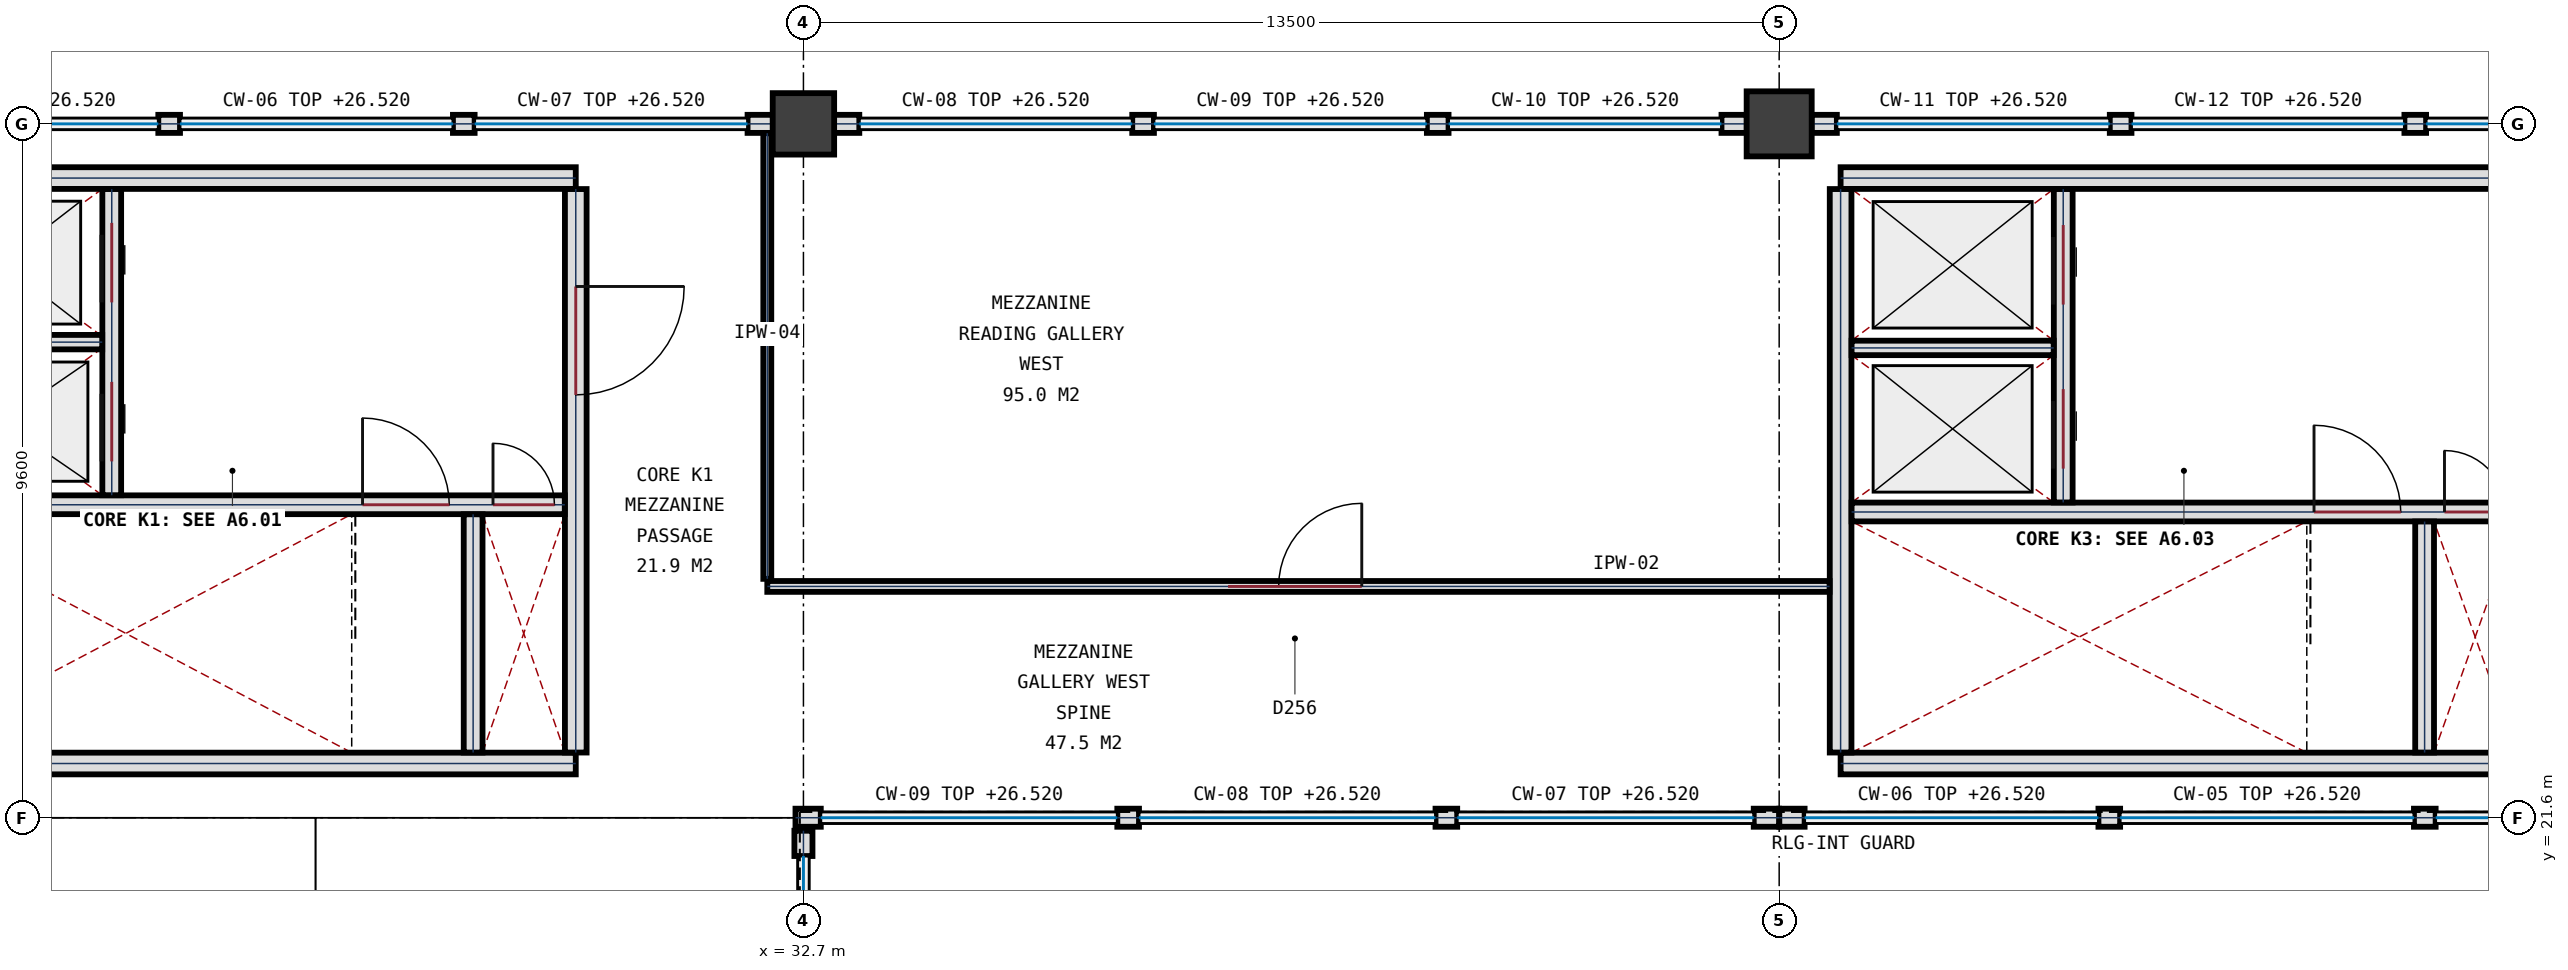
"""IFC4 building model, lengths in metres.
Left out: names, types, materials, properties, quantities, classifications, styles, units other than length and angle.
Written with IfcOpenShell. Run it as: python <this file> out.ifc"""

import sys

from ifc_helpers import new_model, si_unit, direction, frame, frame_2d, origin, origin_2d, place, context, subcontext, project, spatial, rectangle, circle, extrude, element, fill, save


model = new_model("IFC4")
c1 = context("Model", 3, precision=1e-05, world=origin(), true_north=direction((0.0, 1.0)))
c2 = subcontext(c1, "Body", "Model", "MODEL_VIEW")
j1 = project(units=[si_unit("LENGTHUNIT", "METRE"), si_unit("PLANEANGLEUNIT", "RADIAN")], contexts=[c1])
p1 = place(None, origin())
s1 = spatial("IfcSite", under=j1, at=p1, CompositionType="ELEMENT")
p2 = place(p1, origin())
s2 = spatial("IfcBuilding", under=s1, at=p2, CompositionType="ELEMENT")
p3 = place(p2, frame((0.0, 0.0, 23.4)))
s3 = spatial("IfcBuildingStorey", under=s2, at=p3, CompositionType="ELEMENT", Elevation=23.4)
p4 = place(p3, frame((32.7, 31.2, 0.0), z_axis=(0.0, 0.0, 1.0), x_axis=(1.0, 0.0, 0.0)))
e1 = element("IfcColumn", 1, at=p4, inside=s3, PredefinedType="COLUMN", context=c2, shape_type="SweptSolid", body=[
    extrude(rectangle(XDim=0.85, YDim=0.85, at=origin_2d()), origin(), (0.0, 0.0, 1.0), 4.5),
])
p5 = place(p3, frame((46.2, 31.2, 0.0), z_axis=(0.0, 0.0, 1.0), x_axis=(1.0, 0.0, 0.0)))
e2 = element("IfcColumn", 2, at=p5, inside=s3, PredefinedType="COLUMN", context=c2, shape_type="SweptSolid", body=[
    extrude(circle(Radius=0.45, at=origin_2d()), origin(), (0.0, 0.0, 1.0), 4.5),
])
p6 = place(p3, frame((31.927, 31.2, 0.0), z_axis=(0.0, 0.0, 1.0), x_axis=(1.0, 0.0, 0.0)))
e3 = element("IfcWall", 3, at=p6, inside=s3, PredefinedType="SOLIDWALL", context=c2, shape_type="SweptSolid", body=[
    extrude(rectangle(XDim=0.35, YDim=0.25, at=frame_2d((0.175, 0.0))), origin(), (0.0, 0.0, 1.0), 3.12),
])
p7 = place(p3, frame((23.774, 31.2, 0.0), z_axis=(0.0, 0.0, 1.0), x_axis=(1.0, 0.0, 0.0)))
e4 = element("IfcWall", 4, at=p7, inside=s3, PredefinedType="SOLIDWALL", context=c2, shape_type="SweptSolid", body=[
    extrude(rectangle(XDim=0.3, YDim=0.25, at=frame_2d((0.15, 0.0))), origin(), (0.0, 0.0, 1.0), 3.12),
])
p8 = place(p3, frame((27.851, 31.2, 0.0), z_axis=(0.0, 0.0, 1.0), x_axis=(1.0, 0.0, 0.0)))
e5 = element("IfcWall", 5, at=p8, inside=s3, PredefinedType="SOLIDWALL", context=c2, shape_type="SweptSolid", body=[
    extrude(rectangle(XDim=0.3, YDim=0.25, at=frame_2d((0.15, 0.0))), origin(), (0.0, 0.0, 1.0), 3.12),
])
for number, where, z_axis, x_axis in (
    (6, (33.123, 31.2, 0.0), (0.0, 0.0, 1.0), (1.0, 0.0, 0.0)),
    (7, (45.402, 31.2, 0.0), (0.0, 0.0, 1.0), (1.0, 0.0, 0.0)),
):
    element("IfcWall", number, at=place(p3, frame(where, z_axis=z_axis, x_axis=x_axis)), inside=s3, PredefinedType="SOLIDWALL", context=c2, shape_type="SweptSolid", body=[
        extrude(rectangle(XDim=0.35, YDim=0.25, at=frame_2d((0.175, 0.0))), origin(), (0.0, 0.0, 1.0), 3.12),
    ])
for number, where, z_axis, x_axis in (
    (8, (37.249, 31.2, 0.0), (0.0, 0.0, 1.0), (1.0, 0.0, 0.0)),
    (9, (41.326, 31.2, 0.0), (0.0, 0.0, 1.0), (1.0, 0.0, 0.0)),
):
    element("IfcWall", number, at=place(p3, frame(where, z_axis=z_axis, x_axis=x_axis)), inside=s3, PredefinedType="SOLIDWALL", context=c2, shape_type="SweptSolid", body=[
        extrude(rectangle(XDim=0.3, YDim=0.25, at=frame_2d((0.15, 0.0))), origin(), (0.0, 0.0, 1.0), 3.12),
    ])
p9 = place(p3, frame((46.648, 31.2, 0.0), z_axis=(0.0, 0.0, 1.0), x_axis=(1.0, 0.0, 0.0)))
e10 = element("IfcWall", 10, at=p9, inside=s3, PredefinedType="SOLIDWALL", context=c2, shape_type="SweptSolid", body=[
    extrude(rectangle(XDim=0.35, YDim=0.25, at=frame_2d((0.175, 0.0))), origin(), (0.0, 0.0, 1.0), 3.12),
])
p10 = place(p3, frame((50.774, 31.2, 0.0), z_axis=(0.0, 0.0, 1.0), x_axis=(1.0, 0.0, 0.0)))
e11 = element("IfcWall", 11, at=p10, inside=s3, PredefinedType="SOLIDWALL", context=c2, shape_type="SweptSolid", body=[
    extrude(rectangle(XDim=0.3, YDim=0.25, at=frame_2d((0.15, 0.0))), origin(), (0.0, 0.0, 1.0), 3.12),
])
p11 = place(p3, frame((54.851, 31.2, 0.0), z_axis=(0.0, 0.0, 1.0), x_axis=(1.0, 0.0, 0.0)))
e12 = element("IfcWall", 12, at=p11, inside=s3, PredefinedType="SOLIDWALL", context=c2, shape_type="SweptSolid", body=[
    extrude(rectangle(XDim=0.3, YDim=0.25, at=frame_2d((0.15, 0.0))), origin(), (0.0, 0.0, 1.0), 3.12),
])
p12 = place(p3, frame((46.552, 21.6, 0.0), z_axis=(0.0, 0.0, 1.0), x_axis=(-1.0, 0.0, 0.0)))
e13 = element("IfcWall", 13, at=p12, inside=s3, PredefinedType="SOLIDWALL", context=c2, shape_type="SweptSolid", body=[
    extrude(rectangle(XDim=0.35, YDim=0.25, at=frame_2d((0.175, 0.0))), origin(), (0.0, 0.0, 1.0), 3.12),
])
p13 = place(p3, frame((55.283, 21.6, 0.0), z_axis=(0.0, 0.0, 1.0), x_axis=(-1.0, 0.0, 0.0)))
e14 = element("IfcWall", 14, at=p13, inside=s3, PredefinedType="SOLIDWALL", context=c2, shape_type="SweptSolid", body=[
    extrude(rectangle(XDim=0.3, YDim=0.25, at=frame_2d((0.15, 0.0))), origin(), (0.0, 0.0, 1.0), 3.12),
])
p14 = place(p3, frame((50.917, 21.6, 0.0), z_axis=(0.0, 0.0, 1.0), x_axis=(-1.0, 0.0, 0.0)))
e15 = element("IfcWall", 15, at=p14, inside=s3, PredefinedType="SOLIDWALL", context=c2, shape_type="SweptSolid", body=[
    extrude(rectangle(XDim=0.3, YDim=0.25, at=frame_2d((0.15, 0.0))), origin(), (0.0, 0.0, 1.0), 3.12),
])
p15 = place(p3, frame((46.198, 21.6, 0.0), z_axis=(0.0, 0.0, 1.0), x_axis=(-1.0, 0.0, 0.0)))
e16 = element("IfcWall", 16, at=p15, inside=s3, PredefinedType="SOLIDWALL", context=c2, shape_type="SweptSolid", body=[
    extrude(rectangle(XDim=0.35, YDim=0.25, at=frame_2d((0.175, 0.0))), origin(), (0.0, 0.0, 1.0), 3.12),
])
p16 = place(p3, frame((32.94, 21.6, 0.0), z_axis=(0.0, 0.0, 1.0), x_axis=(-1.0, 0.0, 0.0)))
e17 = element("IfcWall", 17, at=p16, inside=s3, PredefinedType="SOLIDWALL", context=c2, shape_type="SweptSolid", body=[
    extrude(rectangle(XDim=0.35, YDim=0.25, at=frame_2d((0.175, 0.0))), origin(), (0.0, 0.0, 1.0), 3.12),
])
for number, where, z_axis, x_axis in (
    (18, (41.745, 21.6, 0.0), (0.0, 0.0, 1.0), (-1.0, 0.0, 0.0)),
    (19, (37.343, 21.6, 0.0), (0.0, 0.0, 1.0), (-1.0, 0.0, 0.0)),
):
    element("IfcWall", number, at=place(p3, frame(where, z_axis=z_axis, x_axis=x_axis)), inside=s3, PredefinedType="SOLIDWALL", context=c2, shape_type="SweptSolid", body=[
        extrude(rectangle(XDim=0.3, YDim=0.25, at=frame_2d((0.15, 0.0))), origin(), (0.0, 0.0, 1.0), 3.12),
    ])
p17 = place(p3, frame((32.7, 21.42, 0.0), z_axis=(0.0, 0.0, 1.0), x_axis=(0.0, -1.0, 0.0)))
e20 = element("IfcWall", 20, at=p17, inside=s3, PredefinedType="SOLIDWALL", context=c2, shape_type="SweptSolid", body=[
    extrude(rectangle(XDim=0.35, YDim=0.25, at=frame_2d((0.175, 0.0))), origin(), (0.0, 0.0, 1.0), 3.12),
])
for number, where, z_axis, x_axis in (
    (21, (29.55, 22.35, 0.0), (0.0, 0.0, 1.0), (-1.0, 0.0, 0.0)),
    (22, (20.05, 30.45, 0.0), (0.0, 0.0, 1.0), (1.0, 0.0, 0.0)),
):
    element("IfcWall", number, at=place(p3, frame(where, z_axis=z_axis, x_axis=x_axis)), inside=s3, PredefinedType="SHEAR", context=c2, shape_type="SweptSolid", body=[
        extrude(rectangle(XDim=9.5, YDim=0.3, at=frame_2d((4.75, 0.0))), origin(), (0.0, 0.0, 1.0), 3.15),
    ])
p18 = place(p3, frame((29.55, 30.298, 0.0), z_axis=(0.0, 0.0, 1.0), x_axis=(0.0, -1.0, 0.0)))
e23 = element("IfcWall", 23, at=p18, inside=s3, PredefinedType="SHEAR", context=c2, shape_type="SweptSolid", body=[
    extrude(rectangle(XDim=7.796, YDim=0.3, at=frame_2d((3.898, 0.0))), origin(), (0.0, 0.0, 1.0), 3.15),
])
p19 = place(p18, frame((1.348, 0.0, 0.0)))
e24 = element("IfcOpeningElement", 24, at=p19, cuts=e23, PredefinedType="OPENING", context=c2, shape_type="SweptSolid", body=[
    extrude(rectangle(XDim=1.5, YDim=2.25, at=frame_2d((0.75, 1.125))), frame((0.0, 0.16, 0.0), z_axis=(0.0, -1.0, 0.0), x_axis=(1.0, 0.0, 0.0)), (0.0, 0.0, 1.0), 0.32),
])
p20 = place(p3, frame((20.202, 25.93, 0.0), z_axis=(0.0, 0.0, 1.0), x_axis=(1.0, 0.0, 0.0)))
e25 = element("IfcWall", 25, at=p20, inside=s3, PredefinedType="SHEAR", context=c2, shape_type="SweptSolid", body=[
    extrude(rectangle(XDim=9.196, YDim=0.26, at=frame_2d((4.598, 0.0))), origin(), (0.0, 0.0, 1.0), 3.15),
])
p21 = place(p20, frame((6.398, 0.0, 0.0)))
e26 = element("IfcOpeningElement", 26, at=p21, cuts=e25, PredefinedType="OPENING", context=c2, shape_type="SweptSolid", body=[
    extrude(rectangle(XDim=1.2, YDim=2.2, at=frame_2d((0.6, 1.1))), frame((0.0, 0.14, 0.0), z_axis=(0.0, -1.0, 0.0), x_axis=(1.0, 0.0, 0.0)), (0.0, 0.0, 1.0), 0.28),
])
p22 = place(p20, frame((8.203, 0.0, 0.0)))
e27 = element("IfcOpeningElement", 27, at=p22, cuts=e25, PredefinedType="OPENING", context=c2, shape_type="SweptSolid", body=[
    extrude(rectangle(XDim=0.85, YDim=2.05, at=frame_2d((0.425, 1.025))), frame((0.0, 0.14, 0.0), z_axis=(0.0, -1.0, 0.0), x_axis=(1.0, 0.0, 0.0)), (0.0, 0.0, 1.0), 0.28),
])
p23 = place(p3, frame((28.13, 22.502, 0.0), z_axis=(0.0, 0.0, 1.0), x_axis=(0.0, 1.0, 0.0)))
e28 = element("IfcWall", 28, at=p23, inside=s3, PredefinedType="SHEAR", context=c2, shape_type="SweptSolid", body=[
    extrude(rectangle(XDim=3.296, YDim=0.26, at=frame_2d((1.648, 0.0))), origin(), (0.0, 0.0, 1.0), 3.15),
])
p24 = place(p3, frame((23.13, 26.062, 0.0), z_axis=(0.0, 0.0, 1.0), x_axis=(0.0, 1.0, 0.0)))
e29 = element("IfcWall", 29, at=p24, inside=s3, PredefinedType="SHEAR", context=c2, shape_type="SweptSolid", body=[
    extrude(rectangle(XDim=4.236, YDim=0.26, at=frame_2d((2.118, 0.0))), origin(), (0.0, 0.0, 1.0), 3.15),
])
p25 = place(p24, frame((0.468, 0.0, 0.0)))
e30 = element("IfcOpeningElement", 30, at=p25, cuts=e29, PredefinedType="OPENING", context=c2, shape_type="SweptSolid", body=[
    extrude(rectangle(XDim=1.1, YDim=2.15, at=frame_2d((0.55, 1.075))), frame((0.0, 0.14, 0.0), z_axis=(0.0, -1.0, 0.0), x_axis=(1.0, 0.0, 0.0)), (0.0, 0.0, 1.0), 0.28),
])
p26 = place(p24, frame((2.668, 0.0, 0.0)))
e31 = element("IfcOpeningElement", 31, at=p26, cuts=e29, PredefinedType="OPENING", context=c2, shape_type="SweptSolid", body=[
    extrude(rectangle(XDim=1.1, YDim=2.15, at=frame_2d((0.55, 1.075))), frame((0.0, 0.14, 0.0), z_axis=(0.0, -1.0, 0.0), x_axis=(1.0, 0.0, 0.0)), (0.0, 0.0, 1.0), 0.28),
])
p27 = place(p3, frame((20.202, 28.18, 0.0), z_axis=(0.0, 0.0, 1.0), x_axis=(1.0, 0.0, 0.0)))
e32 = element("IfcWall", 32, at=p27, inside=s3, PredefinedType="PLUMBINGWALL", context=c2, shape_type="SweptSolid", body=[
    extrude(rectangle(XDim=2.796, YDim=0.2, at=frame_2d((1.398, 0.0))), origin(), (0.0, 0.0, 1.0), 3.1),
])
for number, where, z_axis, x_axis in (
    (33, (56.55, 22.35, 0.0), (0.0, 0.0, 1.0), (-1.0, 0.0, 0.0)),
    (34, (47.05, 30.45, 0.0), (0.0, 0.0, 1.0), (1.0, 0.0, 0.0)),
):
    element("IfcWall", number, at=place(p3, frame(where, z_axis=z_axis, x_axis=x_axis)), inside=s3, PredefinedType="SHEAR", context=c2, shape_type="SweptSolid", body=[
        extrude(rectangle(XDim=9.5, YDim=0.3, at=frame_2d((4.75, 0.0))), origin(), (0.0, 0.0, 1.0), 3.15),
    ])
p28 = place(p3, frame((47.05, 22.502, 0.0), z_axis=(0.0, 0.0, 1.0), x_axis=(0.0, 1.0, 0.0)))
e35 = element("IfcWall", 35, at=p28, inside=s3, PredefinedType="SHEAR", context=c2, shape_type="SweptSolid", body=[
    extrude(rectangle(XDim=7.796, YDim=0.3, at=frame_2d((3.898, 0.0))), origin(), (0.0, 0.0, 1.0), 3.15),
])
p29 = place(p3, frame((47.202, 25.83, 0.0), z_axis=(0.0, 0.0, 1.0), x_axis=(1.0, 0.0, 0.0)))
e36 = element("IfcWall", 36, at=p29, inside=s3, PredefinedType="SHEAR", context=c2, shape_type="SweptSolid", body=[
    extrude(rectangle(XDim=9.196, YDim=0.26, at=frame_2d((4.598, 0.0))), origin(), (0.0, 0.0, 1.0), 3.15),
])
p30 = place(p29, frame((6.398, 0.0, 0.0)))
e37 = element("IfcOpeningElement", 37, at=p30, cuts=e36, PredefinedType="OPENING", context=c2, shape_type="SweptSolid", body=[
    extrude(rectangle(XDim=1.2, YDim=2.2, at=frame_2d((0.6, 1.1))), frame((0.0, 0.14, 0.0), z_axis=(0.0, -1.0, 0.0), x_axis=(1.0, 0.0, 0.0)), (0.0, 0.0, 1.0), 0.28),
])
p31 = place(p29, frame((8.203, 0.0, 0.0)))
e38 = element("IfcOpeningElement", 38, at=p31, cuts=e36, PredefinedType="OPENING", context=c2, shape_type="SweptSolid", body=[
    extrude(rectangle(XDim=0.85, YDim=2.05, at=frame_2d((0.425, 1.025))), frame((0.0, 0.14, 0.0), z_axis=(0.0, -1.0, 0.0), x_axis=(1.0, 0.0, 0.0)), (0.0, 0.0, 1.0), 0.28),
])
p32 = place(p3, frame((55.13, 22.502, 0.0), z_axis=(0.0, 0.0, 1.0), x_axis=(0.0, 1.0, 0.0)))
e39 = element("IfcWall", 39, at=p32, inside=s3, PredefinedType="SHEAR", context=c2, shape_type="SweptSolid", body=[
    extrude(rectangle(XDim=3.196, YDim=0.26, at=frame_2d((1.598, 0.0))), origin(), (0.0, 0.0, 1.0), 3.15),
])
p33 = place(p3, frame((50.13, 25.962, 0.0), z_axis=(0.0, 0.0, 1.0), x_axis=(0.0, 1.0, 0.0)))
e40 = element("IfcWall", 40, at=p33, inside=s3, PredefinedType="SHEAR", context=c2, shape_type="SweptSolid", body=[
    extrude(rectangle(XDim=4.336, YDim=0.26, at=frame_2d((2.168, 0.0))), origin(), (0.0, 0.0, 1.0), 3.15),
])
p34 = place(p33, frame((0.468, 0.0, 0.0)))
e41 = element("IfcOpeningElement", 41, at=p34, cuts=e40, PredefinedType="OPENING", context=c2, shape_type="SweptSolid", body=[
    extrude(rectangle(XDim=1.1, YDim=2.15, at=frame_2d((0.55, 1.075))), frame((0.0, 0.14, 0.0), z_axis=(0.0, -1.0, 0.0), x_axis=(1.0, 0.0, 0.0)), (0.0, 0.0, 1.0), 0.28),
])
p35 = place(p33, frame((2.738, 0.0, 0.0)))
e42 = element("IfcOpeningElement", 42, at=p35, cuts=e40, PredefinedType="OPENING", context=c2, shape_type="SweptSolid", body=[
    extrude(rectangle(XDim=1.1, YDim=2.15, at=frame_2d((0.55, 1.075))), frame((0.0, 0.14, 0.0), z_axis=(0.0, -1.0, 0.0), x_axis=(1.0, 0.0, 0.0)), (0.0, 0.0, 1.0), 0.28),
])
p36 = place(p3, frame((47.202, 28.1, 0.0), z_axis=(0.0, 0.0, 1.0), x_axis=(1.0, 0.0, 0.0)))
e43 = element("IfcWall", 43, at=p36, inside=s3, PredefinedType="PLUMBINGWALL", context=c2, shape_type="SweptSolid", body=[
    extrude(rectangle(XDim=2.796, YDim=0.2, at=frame_2d((1.398, 0.0))), origin(), (0.0, 0.0, 1.0), 3.1),
])
p37 = place(p3, frame((32.2, 24.8, 0.0), z_axis=(0.0, 0.0, 1.0), x_axis=(1.0, 0.0, 0.0)))
e44 = element("IfcWall", 44, at=p37, inside=s3, PredefinedType="PARTITIONING", context=c2, shape_type="SweptSolid", body=[
    extrude(rectangle(XDim=14.697, YDim=0.15, at=frame_2d((7.349, 0.0))), origin(), (0.0, 0.0, 1.0), 3.1),
])
p38 = place(p37, frame((6.375, 0.0, 0.0)))
e45 = element("IfcOpeningElement", 45, at=p38, cuts=e44, PredefinedType="OPENING", context=c2, shape_type="SweptSolid", body=[
    extrude(rectangle(XDim=1.85, YDim=2.35, at=frame_2d((0.925, 1.175))), frame((0.0, 0.085, 0.0), z_axis=(0.0, -1.0, 0.0), x_axis=(1.0, 0.0, 0.0)), (0.0, 0.0, 1.0), 0.17),
])
p39 = place(p3, frame((32.2, 24.905, 0.0), z_axis=(0.0, 0.0, 1.0), x_axis=(0.0, 1.0, 0.0)))
e46 = element("IfcWall", 46, at=p39, inside=s3, PredefinedType="PARTITIONING", context=c2, shape_type="SweptSolid", body=[
    extrude(rectangle(XDim=6.166, YDim=0.11, at=frame_2d((3.083, 0.0))), origin(), (0.0, 0.0, 1.0), 3.1),
])
p40 = place(p19, origin())
e47 = element("IfcDoor", 47, at=p40, inside=s3, OperationType="SINGLE_SWING_LEFT", PredefinedType="DOOR", context=c2, shape_type="SweptSolid", body=[
    extrude(rectangle(XDim=1.5, YDim=2.25, at=frame_2d((0.75, 1.125))), frame((0.0, 0.032, 0.0), z_axis=(0.0, -1.0, 0.0), x_axis=(1.0, 0.0, 0.0)), (0.0, 0.0, 1.0), 0.065),
])
fill(e24, e47)
p41 = place(p21, origin())
e48 = element("IfcDoor", 48, at=p41, inside=s3, OperationType="SINGLE_SWING_LEFT", PredefinedType="DOOR", context=c2, shape_type="SweptSolid", body=[
    extrude(rectangle(XDim=1.2, YDim=2.2, at=frame_2d((0.6, 1.1))), frame((0.0, 0.032, 0.0), z_axis=(0.0, -1.0, 0.0), x_axis=(1.0, 0.0, 0.0)), (0.0, 0.0, 1.0), 0.065),
])
fill(e26, e48)
p42 = place(p22, origin())
e49 = element("IfcDoor", 49, at=p42, inside=s3, OperationType="SINGLE_SWING_LEFT", PredefinedType="DOOR", context=c2, shape_type="SweptSolid", body=[
    extrude(rectangle(XDim=0.85, YDim=2.05, at=frame_2d((0.425, 1.025))), frame((0.0, 0.032, 0.0), z_axis=(0.0, -1.0, 0.0), x_axis=(1.0, 0.0, 0.0)), (0.0, 0.0, 1.0), 0.065),
])
fill(e27, e49)
p43 = place(p25, origin())
e50 = element("IfcDoor", 50, at=p43, inside=s3, OperationType="SLIDING_TO_LEFT", PredefinedType="DOOR", context=c2, shape_type="SweptSolid", body=[
    extrude(rectangle(XDim=1.1, YDim=2.15, at=frame_2d((0.55, 1.075))), frame((0.0, 0.032, 0.0), z_axis=(0.0, -1.0, 0.0), x_axis=(1.0, 0.0, 0.0)), (0.0, 0.0, 1.0), 0.065),
])
fill(e30, e50)
p44 = place(p26, origin())
e51 = element("IfcDoor", 51, at=p44, inside=s3, OperationType="SLIDING_TO_LEFT", PredefinedType="DOOR", context=c2, shape_type="SweptSolid", body=[
    extrude(rectangle(XDim=1.1, YDim=2.15, at=frame_2d((0.55, 1.075))), frame((0.0, 0.032, 0.0), z_axis=(0.0, -1.0, 0.0), x_axis=(1.0, 0.0, 0.0)), (0.0, 0.0, 1.0), 0.065),
])
fill(e31, e51)
p45 = place(p30, origin())
e52 = element("IfcDoor", 52, at=p45, inside=s3, OperationType="SINGLE_SWING_LEFT", PredefinedType="DOOR", context=c2, shape_type="SweptSolid", body=[
    extrude(rectangle(XDim=1.2, YDim=2.2, at=frame_2d((0.6, 1.1))), frame((0.0, 0.032, 0.0), z_axis=(0.0, -1.0, 0.0), x_axis=(1.0, 0.0, 0.0)), (0.0, 0.0, 1.0), 0.065),
])
fill(e37, e52)
p46 = place(p31, origin())
e53 = element("IfcDoor", 53, at=p46, inside=s3, OperationType="SINGLE_SWING_LEFT", PredefinedType="DOOR", context=c2, shape_type="SweptSolid", body=[
    extrude(rectangle(XDim=0.85, YDim=2.05, at=frame_2d((0.425, 1.025))), frame((0.0, 0.032, 0.0), z_axis=(0.0, -1.0, 0.0), x_axis=(1.0, 0.0, 0.0)), (0.0, 0.0, 1.0), 0.065),
])
fill(e38, e53)
p47 = place(p34, origin())
e54 = element("IfcDoor", 54, at=p47, inside=s3, OperationType="SLIDING_TO_LEFT", PredefinedType="DOOR", context=c2, shape_type="SweptSolid", body=[
    extrude(rectangle(XDim=1.1, YDim=2.15, at=frame_2d((0.55, 1.075))), frame((0.0, 0.032, 0.0), z_axis=(0.0, -1.0, 0.0), x_axis=(1.0, 0.0, 0.0)), (0.0, 0.0, 1.0), 0.065),
])
fill(e41, e54)
p48 = place(p35, origin())
e55 = element("IfcDoor", 55, at=p48, inside=s3, OperationType="SLIDING_TO_LEFT", PredefinedType="DOOR", context=c2, shape_type="SweptSolid", body=[
    extrude(rectangle(XDim=1.1, YDim=2.15, at=frame_2d((0.55, 1.075))), frame((0.0, 0.032, 0.0), z_axis=(0.0, -1.0, 0.0), x_axis=(1.0, 0.0, 0.0)), (0.0, 0.0, 1.0), 0.065),
])
fill(e42, e55)
p49 = place(p38, origin())
e56 = element("IfcDoor", 56, at=p49, inside=s3, OperationType="SINGLE_SWING_RIGHT", PredefinedType="DOOR", context=c2, shape_type="SweptSolid", body=[
    extrude(rectangle(XDim=1.85, YDim=2.35, at=frame_2d((0.925, 1.175))), frame((0.0, 0.032, 0.0), z_axis=(0.0, -1.0, 0.0), x_axis=(1.0, 0.0, 0.0)), (0.0, 0.0, 1.0), 0.065),
])
fill(e45, e56)
save(model, sys.argv[1])
